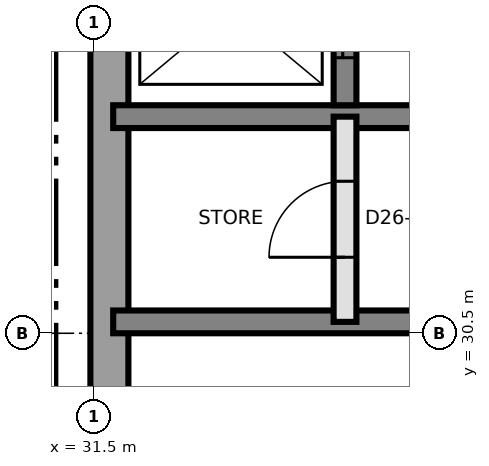
"""IFC4 building model, lengths in metres.
Left out: names, types, materials, properties, quantities, classifications, styles, units other than length and angle.
Written with IfcOpenShell. Run it as: python <this file> out.ifc"""

import sys

from ifc_helpers import new_model, si_unit, direction, frame, frame_2d, origin, place, context, subcontext, project, spatial, rectangle, extrude, element, fill, save


model = new_model("IFC4")
c1 = context("Model", 3, precision=1e-05, world=origin(), true_north=direction((0.0, 1.0)))
c2 = subcontext(c1, "Body", "Model", "MODEL_VIEW")
j1 = project(units=[si_unit("LENGTHUNIT", "METRE"), si_unit("PLANEANGLEUNIT", "RADIAN")], contexts=[c1])
p1 = place(None, origin())
s1 = spatial("IfcSite", under=j1, at=p1, CompositionType="ELEMENT")
p2 = place(p1, origin())
s2 = spatial("IfcBuilding", under=s1, at=p2, CompositionType="ELEMENT")
p3 = place(p2, frame((0.0, 0.0, 232.8)))
s3 = spatial("IfcBuildingStorey", under=s2, at=p3, CompositionType="ELEMENT", Elevation=232.8)
p4 = place(p3, frame((31.7, 21.75, 0.0), z_axis=(0.0, 0.0, 1.0), x_axis=(0.0, 1.0, 0.0)))
e1 = element("IfcWall", 1, at=p4, inside=s3, PredefinedType="SHEAR", context=c2, shape_type="SweptSolid", body=[
    extrude(rectangle(XDim=17.5, YDim=0.5, at=frame_2d((8.75, 0.0))), origin(), (0.0, 0.0, 1.0), 3.7),
])
p5 = place(p3, frame((31.75, 30.65, 0.0), z_axis=(0.0, 0.0, 1.0), x_axis=(1.0, 0.0, 0.0)))
e2 = element("IfcWall", 2, at=p5, inside=s3, PredefinedType="SHEAR", context=c2, shape_type="SweptSolid", body=[
    extrude(rectangle(XDim=26.5, YDim=0.3, at=frame_2d((13.25, 0.0))), origin(), (0.0, 0.0, 1.0), 3.7),
])
p6 = place(p5, frame((24.75, 0.0, 0.0)))
e3 = element("IfcOpeningElement", 3, at=p6, cuts=e2, PredefinedType="OPENING", context=c2, shape_type="SweptSolid", body=[
    extrude(rectangle(XDim=1.0, YDim=2.1, at=frame_2d((0.5, 1.05))), frame((0.0, 0.16, 0.0), z_axis=(0.0, -1.0, 0.0), x_axis=(1.0, 0.0, 0.0)), (0.0, 0.0, 1.0), 0.32),
])
p7 = place(p3, frame((31.75, 33.35, 0.0), z_axis=(0.0, 0.0, 1.0), x_axis=(1.0, 0.0, 0.0)))
e4 = element("IfcWall", 4, at=p7, inside=s3, PredefinedType="SHEAR", context=c2, shape_type="SweptSolid", body=[
    extrude(rectangle(XDim=26.5, YDim=0.3, at=frame_2d((13.25, 0.0))), origin(), (0.0, 0.0, 1.0), 3.7),
])
p8 = place(p7, frame((13.9, 0.0, 0.0)))
e5 = element("IfcOpeningElement", 5, at=p8, cuts=e4, PredefinedType="OPENING", context=c2, shape_type="SweptSolid", body=[
    extrude(rectangle(XDim=1.4, YDim=2.1, at=frame_2d((0.7, 1.05))), frame((0.0, 0.16, 0.0), z_axis=(0.0, -1.0, 0.0), x_axis=(1.0, 0.0, 0.0)), (0.0, 0.0, 1.0), 0.32),
])
p9 = place(p7, frame((5.375, 0.0, 0.0)))
e6 = element("IfcOpeningElement", 6, at=p9, cuts=e4, PredefinedType="OPENING", context=c2, shape_type="SweptSolid", body=[
    extrude(rectangle(XDim=1.2, YDim=2.1, at=frame_2d((0.6, 1.05))), frame((0.0, 0.16, 0.0), z_axis=(0.0, -1.0, 0.0), x_axis=(1.0, 0.0, 0.0)), (0.0, 0.0, 1.0), 0.32),
])
p10 = place(p7, frame((19.925, 0.0, 0.0)))
e7 = element("IfcOpeningElement", 7, at=p10, cuts=e4, PredefinedType="OPENING", context=c2, shape_type="SweptSolid", body=[
    extrude(rectangle(XDim=1.2, YDim=2.1, at=frame_2d((0.6, 1.05))), frame((0.0, 0.16, 0.0), z_axis=(0.0, -1.0, 0.0), x_axis=(1.0, 0.0, 0.0)), (0.0, 0.0, 1.0), 0.32),
])
p11 = place(p3, frame((34.8, 33.5, 0.0), z_axis=(0.0, 0.0, 1.0), x_axis=(0.0, 1.0, 0.0)))
e8 = element("IfcWall", 8, at=p11, inside=s3, PredefinedType="SHEAR", context=c2, shape_type="SweptSolid", body=[
    extrude(rectangle(XDim=2.55, YDim=0.3, at=frame_2d((1.275, 0.0))), origin(), (0.0, 0.0, 1.0), 3.7),
])
p12 = place(p11, frame((0.625, 0.0, 0.0)))
e9 = element("IfcOpeningElement", 9, at=p12, cuts=e8, PredefinedType="OPENING", context=c2, shape_type="SweptSolid", body=[
    extrude(rectangle(XDim=1.3, YDim=2.4, at=frame_2d((0.65, 1.2))), frame((0.0, 0.16, 0.0), z_axis=(0.0, -1.0, 0.0), x_axis=(1.0, 0.0, 0.0)), (0.0, 0.0, 1.0), 0.32),
])
p13 = place(p3, frame((34.8, 30.65, 0.0), z_axis=(0.0, 0.0, 1.0), x_axis=(0.0, 1.0, 0.0)))
e10 = element("IfcWall", 10, at=p13, inside=s3, PredefinedType="SOLIDWALL", context=c2, shape_type="SweptSolid", body=[
    extrude(rectangle(XDim=2.7, YDim=0.3, at=frame_2d((1.35, 0.0))), origin(), (0.0, 0.0, 1.0), 3.4),
])
p14 = place(p13, frame((0.85, 0.0, 0.0)))
e11 = element("IfcOpeningElement", 11, at=p14, cuts=e10, PredefinedType="OPENING", context=c2, shape_type="SweptSolid", body=[
    extrude(rectangle(XDim=1.0, YDim=2.1, at=frame_2d((0.5, 1.05))), frame((0.0, 0.16, 0.0), z_axis=(0.0, -1.0, 0.0), x_axis=(1.0, 0.0, 0.0)), (0.0, 0.0, 1.0), 0.32),
])
p15 = place(p12, origin())
e12 = element("IfcDoor", 12, at=p15, inside=s3, OperationType="SLIDING_TO_LEFT", PredefinedType="DOOR", context=c2, shape_type="SweptSolid", body=[
    extrude(rectangle(XDim=1.3, YDim=2.4, at=frame_2d((0.65, 1.2))), frame((0.0, 0.025, 0.0), z_axis=(0.0, -1.0, 0.0), x_axis=(1.0, 0.0, 0.0)), (0.0, 0.0, 1.0), 0.05),
])
fill(e9, e12)
p16 = place(p14, origin())
e13 = element("IfcDoor", 13, at=p16, inside=s3, OperationType="SINGLE_SWING_LEFT", PredefinedType="DOOR", context=c2, shape_type="SweptSolid", body=[
    extrude(rectangle(XDim=1.0, YDim=2.1, at=frame_2d((0.5, 1.05))), frame((0.0, 0.025, 0.0), z_axis=(0.0, -1.0, 0.0), x_axis=(1.0, 0.0, 0.0)), (0.0, 0.0, 1.0), 0.05),
])
fill(e11, e13)
save(model, sys.argv[1])
